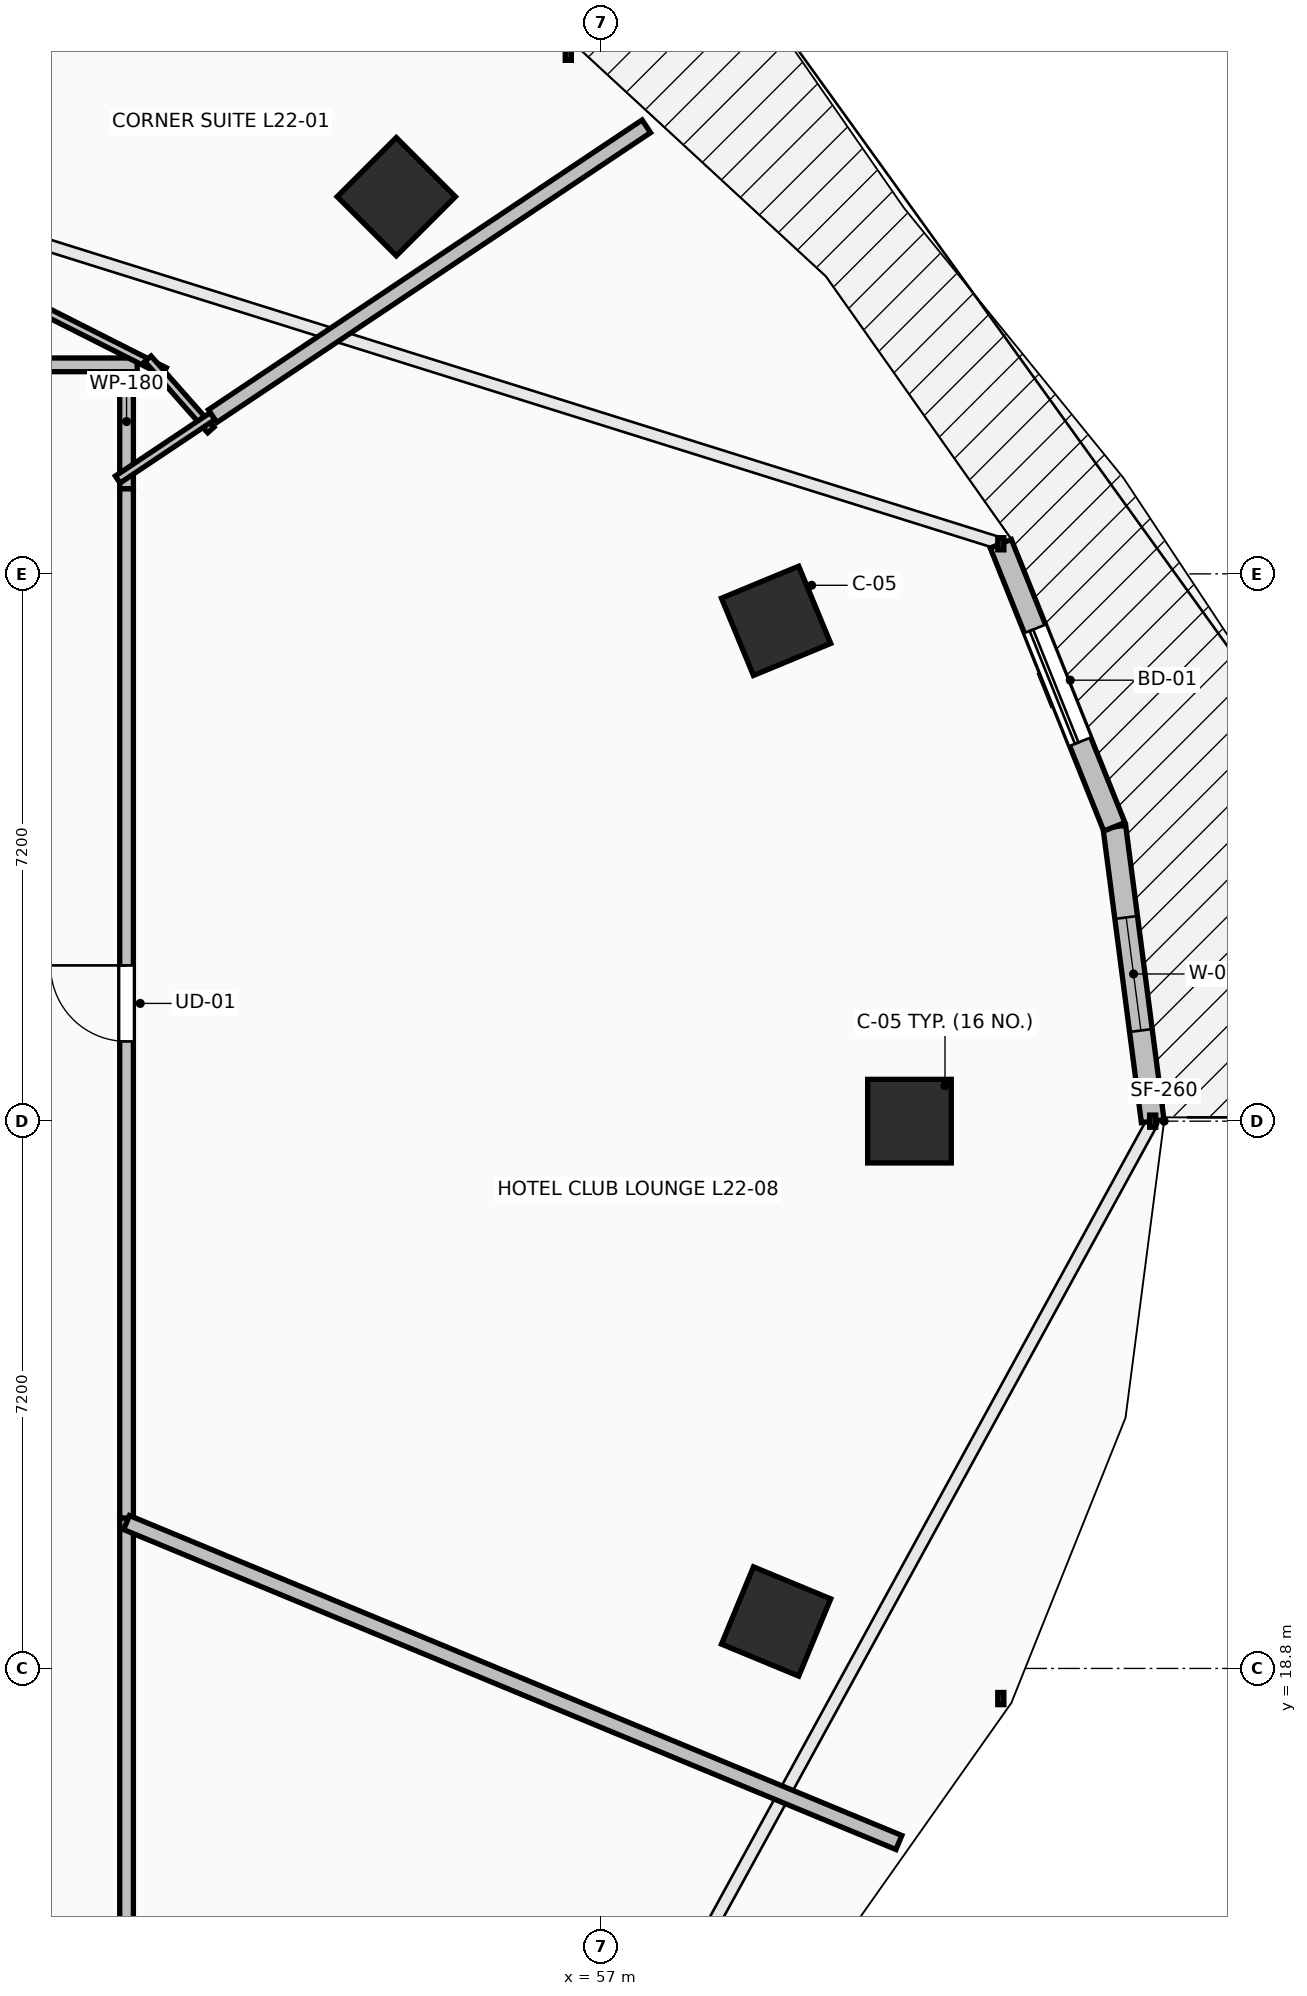
"""IFC4 building model, lengths in metres.
Left out: names, types, materials, properties, quantities, classifications, styles, units other than length and angle.
Written with IfcOpenShell. Run it as: python <this file> out.ifc"""

import sys

from ifc_helpers import new_model, si_unit, direction, frame, frame_2d, origin, origin_2d, place, context, subcontext, project, spatial, rectangle, extrude, element, fill, save


model = new_model("IFC4")
c1 = context("Model", 3, precision=1e-05, world=origin(), true_north=direction((0.0, 1.0)))
c2 = subcontext(c1, "Body", "Model", "MODEL_VIEW")
j1 = project(units=[si_unit("LENGTHUNIT", "METRE"), si_unit("PLANEANGLEUNIT", "RADIAN")], contexts=[c1])
p1 = place(None, origin())
s1 = spatial("IfcSite", under=j1, at=p1, CompositionType="ELEMENT")
p2 = place(p1, origin())
s2 = spatial("IfcBuilding", under=s1, at=p2, CompositionType="ELEMENT")
p3 = place(p2, frame((0.0, 0.0, 85.8)))
s3 = spatial("IfcBuildingStorey", under=s2, at=p3, CompositionType="ELEMENT", Elevation=85.8)
for number, where, z_axis, x_axis in (
    (1, (61.05, 26.0, 0.0), (0.0, 0.0, 1.0), (1.0, 0.0, 0.0)),
    (2, (59.295, 32.582, 0.0), (0.0, 0.0, 1.0), (0.924, 0.383, 0.0)),
    (3, (54.299, 38.162, 0.0), (0.0, 0.0, 1.0), (0.707, 0.707, 0.0)),
    (4, (59.295, 19.418, 0.0), (0.0, 0.0, 1.0), (0.924, -0.383, 0.0)),
):
    element("IfcColumn", number, at=place(p3, frame(where, z_axis=z_axis, x_axis=x_axis)), inside=s3, PredefinedType="COLUMN", context=c2, shape_type="SweptSolid", body=[
        extrude(rectangle(XDim=1.1, YDim=1.1, at=origin_2d()), origin(), (0.0, 0.0, 1.0), 3.5),
    ])
p4 = place(p3, frame((64.25, 26.0, 0.0), z_axis=(0.0, 0.0, 1.0), x_axis=(-0.129157444793, 0.991624099372, 0.0)))
e5 = element("IfcWall", 5, at=p4, inside=s3, PredefinedType="STANDARD", context=c2, shape_type="SweptSolid", body=[
    extrude(rectangle(XDim=3.905, YDim=0.3, at=frame_2d((1.953, 0.0))), origin(), (0.0, 0.0, 1.0), 3.24),
])
p5 = place(p4, frame((1.203, 0.0, 0.85)))
e6 = element("IfcOpeningElement", 6, at=p5, cuts=e5, PredefinedType="OPENING", context=c2, shape_type="SweptSolid", body=[
    extrude(rectangle(XDim=1.5, YDim=2.19, at=frame_2d((0.75, 1.095))), frame((0.0, 0.165, 0.0), z_axis=(0.0, -1.0, 0.0), x_axis=(1.0, 0.0, 0.0)), (0.0, 0.0, 1.0), 0.33),
])
p6 = place(p3, frame((63.746, 29.873, 0.0), z_axis=(0.0, 0.0, 1.0), x_axis=(-0.372345205928, 0.92809430966, 0.0)))
e7 = element("IfcWall", 7, at=p6, inside=s3, PredefinedType="STANDARD", context=c2, shape_type="SweptSolid", body=[
    extrude(rectangle(XDim=4.012, YDim=0.3, at=frame_2d((2.006, 0.0))), origin(), (0.0, 0.0, 1.0), 3.24),
])
p7 = place(p6, frame((1.206, 0.0, 0.0)))
e8 = element("IfcOpeningElement", 8, at=p7, cuts=e7, PredefinedType="OPENING", context=c2, shape_type="SweptSolid", body=[
    extrude(rectangle(XDim=1.6, YDim=2.3, at=frame_2d((0.8, 1.15))), frame((0.0, 0.165, 0.0), z_axis=(0.0, -1.0, 0.0), x_axis=(1.0, 0.0, 0.0)), (0.0, 0.0, 1.0), 0.33),
])
p8 = place(p3, frame((50.75, 34.319, 0.0), z_axis=(0.0, 0.0, 1.0), x_axis=(0.0, 1.0, 0.0)))
e9 = element("IfcWall", 9, at=p8, inside=s3, PredefinedType="PARTITIONING", context=c2, shape_type="SweptSolid", body=[
    extrude(rectangle(XDim=1.771, YDim=0.18, at=frame_2d((0.885, 0.0))), origin(), (0.0, 0.0, 1.0), 2.432),
])
p9 = place(p3, frame((50.89, 35.95, 0.0), z_axis=(0.0, 0.0, 1.0), x_axis=(-1.0, 0.0, 0.0)))
e10 = element("IfcWall", 10, at=p9, inside=s3, PredefinedType="PARTITIONING", context=c2, shape_type="SweptSolid", body=[
    extrude(rectangle(XDim=5.606, YDim=0.18, at=frame_2d((2.803, 0.0))), origin(), (0.0, 0.0, 1.0), 2.432),
])
p10 = place(p3, frame((50.75, 14.1, 0.0), z_axis=(0.0, 0.0, 1.0), x_axis=(0.0, 1.0, 0.0)))
e11 = element("IfcWall", 11, at=p10, inside=s3, PredefinedType="PARTITIONING", context=c2, shape_type="SweptSolid", body=[
    extrude(rectangle(XDim=6.679, YDim=0.18, at=frame_2d((3.339, 0.0))), origin(), (0.0, 0.0, 1.0), 2.432),
])
p11 = place(p3, frame((50.75, 20.779, 0.0), z_axis=(0.0, 0.0, 1.0), x_axis=(0.0, 1.0, 0.0)))
e12 = element("IfcWall", 12, at=p11, inside=s3, PredefinedType="PARTITIONING", context=c2, shape_type="SweptSolid", body=[
    extrude(rectangle(XDim=13.54, YDim=0.18, at=frame_2d((6.77, 0.0))), origin(), (0.0, 0.0, 1.0), 2.432),
])
p12 = place(p11, frame((6.27, 0.0, 0.0)))
e13 = element("IfcOpeningElement", 13, at=p12, cuts=e12, PredefinedType="OPENING", context=c2, shape_type="SweptSolid", body=[
    extrude(rectangle(XDim=1.0, YDim=2.15, at=frame_2d((0.5, 1.075))), frame((0.0, 0.105, 0.0), z_axis=(0.0, -1.0, 0.0), x_axis=(1.0, 0.0, 0.0)), (0.0, 0.0, 1.0), 0.21),
])
p13 = place(p3, frame((46.78, 38.12, 0.0), z_axis=(0.0, 0.0, 1.0), x_axis=(0.892517538434, -0.451012686726, 0.0)))
e14 = element("IfcWall", 14, at=p13, inside=s3, PredefinedType="PARTITIONING", context=c2, shape_type="SweptSolid", body=[
    extrude(rectangle(XDim=5.007, YDim=0.11, at=frame_2d((2.503, 0.0))), origin(), (0.0, 0.0, 1.0), 2.432),
])
p14 = place(p13, frame((2.079, 0.0, 0.0)))
e15 = element("IfcOpeningElement", 15, at=p14, cuts=e14, PredefinedType="OPENING", context=c2, shape_type="SweptSolid", body=[
    extrude(rectangle(XDim=0.85, YDim=2.1, at=frame_2d((0.425, 1.05))), frame((0.0, 0.07, 0.0), z_axis=(0.0, -1.0, 0.0), x_axis=(1.0, 0.0, 0.0)), (0.0, 0.0, 1.0), 0.14),
])
p15 = place(p3, frame((51.031, 36.03, 0.0), z_axis=(0.0, 0.0, 1.0), x_axis=(0.661996266618, -0.749507133377, 0.0)))
e16 = element("IfcWall", 16, at=p15, inside=s3, PredefinedType="PARTITIONING", context=c2, shape_type="SweptSolid", body=[
    extrude(rectangle(XDim=1.25, YDim=0.11, at=frame_2d((0.625, 0.0))), origin(), (0.0, 0.0, 1.0), 2.432),
])
p16 = place(p3, frame((51.882, 35.276, 0.0), z_axis=(0.0, 0.0, 1.0), x_axis=(-0.831374526136, -0.555712513169, 0.0)))
e17 = element("IfcWall", 17, at=p16, inside=s3, PredefinedType="PARTITIONING", context=c2, shape_type="SweptSolid", body=[
    extrude(rectangle(XDim=1.502, YDim=0.11, at=frame_2d((0.751, 0.0))), origin(), (0.0, 0.0, 1.0), 2.922),
])
p17 = place(p3, frame((51.883, 35.276, 0.0), z_axis=(0.0, 0.0, 1.0), x_axis=(0.831464132421, 0.555578434154, 0.0)))
e18 = element("IfcWall", 18, at=p17, inside=s3, PredefinedType="PARTITIONING", context=c2, shape_type="SweptSolid", body=[
    extrude(rectangle(XDim=6.862, YDim=0.2, at=frame_2d((3.431, 0.0))), origin(), (0.0, 0.0, 1.0), 2.677),
])
p18 = place(p3, frame((60.911, 16.51, 0.0), z_axis=(0.0, 0.0, 1.0), x_axis=(-0.923872894692, 0.382699457086, 0.0)))
e19 = element("IfcWall", 19, at=p18, inside=s3, PredefinedType="PARTITIONING", context=c2, shape_type="SweptSolid", body=[
    extrude(rectangle(XDim=10.998, YDim=0.2, at=frame_2d((5.499, 0.0))), origin(), (0.0, 0.0, 1.0), 2.677),
])
p19 = place(p7, origin())
e20 = element("IfcDoor", 20, at=p19, inside=s3, OperationType="SLIDING_TO_LEFT", PredefinedType="DOOR", context=c2, shape_type="SweptSolid", body=[
    extrude(rectangle(XDim=1.6, YDim=2.3, at=frame_2d((0.8, 1.15))), frame((0.0, 0.025, 0.0), z_axis=(0.0, -1.0, 0.0), x_axis=(1.0, 0.0, 0.0)), (0.0, 0.0, 1.0), 0.05),
])
fill(e8, e20)
p20 = place(p5, origin())
e21 = element("IfcWindow", 21, at=p20, inside=s3, PartitioningType="SINGLE_PANEL", PredefinedType="WINDOW", context=c2, shape_type="SweptSolid", body=[
    extrude(rectangle(XDim=1.5, YDim=2.19, at=frame_2d((0.75, 1.095))), frame((0.0, 0.03, 0.0), z_axis=(0.0, -1.0, 0.0), x_axis=(1.0, 0.0, 0.0)), (0.0, 0.0, 1.0), 0.06),
])
fill(e6, e21)
p21 = place(p12, origin())
e22 = element("IfcDoor", 22, at=p21, inside=s3, OperationType="SINGLE_SWING_RIGHT", PredefinedType="DOOR", context=c2, shape_type="SweptSolid", body=[
    extrude(rectangle(XDim=1.0, YDim=2.15, at=frame_2d((0.5, 1.075))), frame((0.0, 0.025, 0.0), z_axis=(0.0, -1.0, 0.0), x_axis=(1.0, 0.0, 0.0)), (0.0, 0.0, 1.0), 0.05),
])
fill(e13, e22)
save(model, sys.argv[1])
